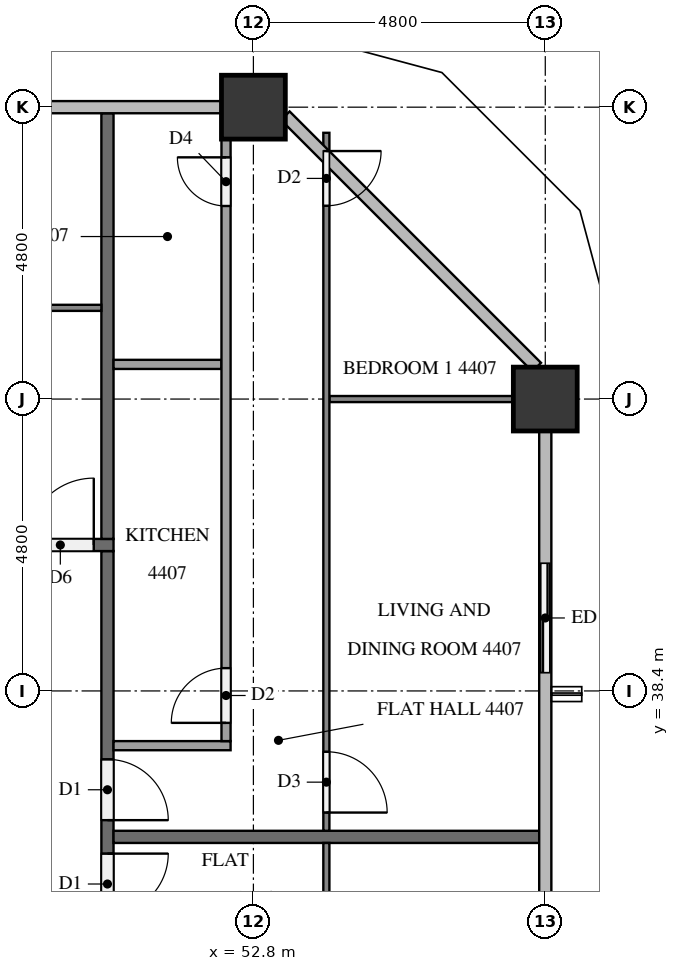
"""IFC4 building model, lengths in metres.
Left out: names, types, materials, properties, quantities, classifications, styles, units other than length and angle.
Written with IfcOpenShell. Run it as: python <this file> out.ifc"""

import sys

from ifc_helpers import new_model, si_unit, direction, frame, frame_2d, origin, origin_2d, place, context, subcontext, project, spatial, rectangle, extrude, element, fill, save


model = new_model("IFC4")
c1 = context("Model", 3, precision=1e-05, world=origin(), true_north=direction((0.0, 1.0)))
c2 = subcontext(c1, "Body", "Model", "MODEL_VIEW")
j1 = project(units=[si_unit("LENGTHUNIT", "METRE"), si_unit("PLANEANGLEUNIT", "RADIAN")], contexts=[c1])
p1 = place(None, origin())
s1 = spatial("IfcSite", under=j1, at=p1, CompositionType="ELEMENT")
p2 = place(p1, origin())
s2 = spatial("IfcBuilding", under=s1, at=p2, CompositionType="ELEMENT")
p3 = place(p2, frame((0.0, 0.0, 170.0)))
s3 = spatial("IfcBuildingStorey", under=s2, at=p3, CompositionType="ELEMENT", Elevation=170.0)
for number, where, z_axis, x_axis in (
    (1, (57.6, 43.2, 0.0), (0.0, 0.0, 1.0), (1.0, 0.0, 0.0)),
    (2, (52.8, 48.0, 0.0), (0.0, 0.0, 1.0), (1.0, 0.0, 0.0)),
):
    element("IfcColumn", number, at=place(p3, frame(where, z_axis=z_axis, x_axis=x_axis)), inside=s3, PredefinedType="COLUMN", context=c2, shape_type="SweptSolid", body=[
        extrude(rectangle(XDim=1.05, YDim=1.05, at=origin_2d()), origin(), (0.0, 0.0, 1.0), 3.1),
    ])
p4 = place(p3, frame((57.6, 38.4, 0.0), z_axis=(0.0, 0.0, 1.0), x_axis=(0.0, 1.0, 0.0)))
e3 = element("IfcWall", 3, at=p4, inside=s3, PredefinedType="SOLIDWALL", context=c2, shape_type="SweptSolid", body=[
    extrude(rectangle(XDim=2.4, YDim=0.15, at=frame_2d((1.2, 0.0))), origin(), (0.0, 0.0, 1.0), 3.1),
])
p5 = place(p4, frame((0.3, 0.0, 0.0)))
e4 = element("IfcOpeningElement", 4, at=p5, cuts=e3, PredefinedType="OPENING", context=c2, shape_type="SweptSolid", body=[
    extrude(rectangle(XDim=1.8, YDim=2.4, at=frame_2d((0.9, 1.2))), frame((0.0, 0.085, 0.0), z_axis=(0.0, -1.0, 0.0), x_axis=(1.0, 0.0, 0.0)), (0.0, 0.0, 1.0), 0.17),
])
p6 = place(p3, frame((50.4, 40.7, 0.0), z_axis=(0.0, 0.0, 1.0), x_axis=(0.0, -1.0, 0.0)))
e5 = element("IfcWall", 5, at=p6, inside=s3, PredefinedType="PARTITIONING", context=c2, shape_type="SweptSolid", body=[
    extrude(rectangle(XDim=28.6, YDim=0.2, at=frame_2d((14.3, 0.0))), origin(), (0.0, 0.0, 1.0), 3.1),
])
p7 = place(p6, frame((26.575, 0.0, 0.0)))
e6 = element("IfcOpeningElement", 6, at=p7, cuts=e5, PredefinedType="OPENING", context=c2, shape_type="SweptSolid", body=[
    extrude(rectangle(XDim=1.0, YDim=2.1, at=frame_2d((0.5, 1.05))), frame((0.0, 0.11, 0.0), z_axis=(0.0, -1.0, 0.0), x_axis=(1.0, 0.0, 0.0)), (0.0, 0.0, 1.0), 0.22),
])
p8 = place(p6, frame((25.025, 0.0, 0.0)))
e7 = element("IfcOpeningElement", 7, at=p8, cuts=e5, PredefinedType="OPENING", context=c2, shape_type="SweptSolid", body=[
    extrude(rectangle(XDim=1.0, YDim=2.1, at=frame_2d((0.5, 1.05))), frame((0.0, 0.11, 0.0), z_axis=(0.0, -1.0, 0.0), x_axis=(1.0, 0.0, 0.0)), (0.0, 0.0, 1.0), 0.22),
])
p9 = place(p6, frame((4.975, 0.0, 0.0)))
e8 = element("IfcOpeningElement", 8, at=p9, cuts=e5, PredefinedType="OPENING", context=c2, shape_type="SweptSolid", body=[
    extrude(rectangle(XDim=1.0, YDim=2.1, at=frame_2d((0.5, 1.05))), frame((0.0, 0.11, 0.0), z_axis=(0.0, -1.0, 0.0), x_axis=(1.0, 0.0, 0.0)), (0.0, 0.0, 1.0), 0.22),
])
p10 = place(p6, frame((3.425, 0.0, 0.0)))
e9 = element("IfcOpeningElement", 9, at=p10, cuts=e5, PredefinedType="OPENING", context=c2, shape_type="SweptSolid", body=[
    extrude(rectangle(XDim=1.0, YDim=2.1, at=frame_2d((0.5, 1.05))), frame((0.0, 0.11, 0.0), z_axis=(0.0, -1.0, 0.0), x_axis=(1.0, 0.0, 0.0)), (0.0, 0.0, 1.0), 0.22),
])
p11 = place(p3, frame((11.9, 40.8, 0.0), z_axis=(0.0, 0.0, 1.0), x_axis=(1.0, 0.0, 0.0)))
e10 = element("IfcWall", 10, at=p11, inside=s3, PredefinedType="PARTITIONING", context=c2, shape_type="SweptSolid", body=[
    extrude(rectangle(XDim=38.6, YDim=0.2, at=frame_2d((19.3, 0.0))), origin(), (0.0, 0.0, 1.0), 3.1),
])
p12 = place(p11, frame((37.175, 0.0, 0.0)))
e11 = element("IfcOpeningElement", 11, at=p12, cuts=e10, PredefinedType="OPENING", context=c2, shape_type="SweptSolid", body=[
    extrude(rectangle(XDim=1.1, YDim=2.1, at=frame_2d((0.55, 1.05))), frame((0.0, 0.11, 0.0), z_axis=(0.0, -1.0, 0.0), x_axis=(1.0, 0.0, 0.0)), (0.0, 0.0, 1.0), 0.22),
])
p13 = place(p11, frame((18.025, 0.0, 0.0)))
e12 = element("IfcOpeningElement", 12, at=p13, cuts=e10, PredefinedType="OPENING", context=c2, shape_type="SweptSolid", body=[
    extrude(rectangle(XDim=1.0, YDim=2.1, at=frame_2d((0.5, 1.05))), frame((0.0, 0.11, 0.0), z_axis=(0.0, -1.0, 0.0), x_axis=(1.0, 0.0, 0.0)), (0.0, 0.0, 1.0), 0.22),
])
p14 = place(p11, frame((3.625, 0.0, 0.0)))
e13 = element("IfcOpeningElement", 13, at=p14, cuts=e10, PredefinedType="OPENING", context=c2, shape_type="SweptSolid", body=[
    extrude(rectangle(XDim=1.0, YDim=2.1, at=frame_2d((0.5, 1.05))), frame((0.0, 0.11, 0.0), z_axis=(0.0, -1.0, 0.0), x_axis=(1.0, 0.0, 0.0)), (0.0, 0.0, 1.0), 0.22),
])
for number, where, z_axis, x_axis in (
    (14, (50.5, 36.0, 0.0), (0.0, 0.0, 1.0), (1.0, 0.0, 0.0)),
    (15, (50.4, 40.9, 0.0), (0.0, 0.0, 1.0), (0.0, 1.0, 0.0)),
):
    element("IfcWall", number, at=place(p3, frame(where, z_axis=z_axis, x_axis=x_axis)), inside=s3, PredefinedType="PARTITIONING", context=c2, shape_type="SweptSolid", body=[
        extrude(rectangle(XDim=7.0, YDim=0.2, at=frame_2d((3.5, 0.0))), origin(), (0.0, 0.0, 1.0), 3.1),
    ])
p15 = place(p3, frame((54.0, 35.9, 0.0), z_axis=(0.0, 0.0, 1.0), x_axis=(0.0, -1.0, 0.0)))
e16 = element("IfcWall", 16, at=p15, inside=s3, PredefinedType="PARTITIONING", context=c2, shape_type="SweptSolid", body=[
    extrude(rectangle(XDim=7.0, YDim=0.1, at=frame_2d((3.5, 0.0))), origin(), (0.0, 0.0, 1.0), 3.1),
])
p16 = place(p15, frame((5.7, 0.0, 0.0)))
e17 = element("IfcOpeningElement", 17, at=p16, cuts=e16, PredefinedType="OPENING", context=c2, shape_type="SweptSolid", body=[
    extrude(rectangle(XDim=1.0, YDim=2.1, at=frame_2d((0.5, 1.05))), frame((0.0, 0.06, 0.0), z_axis=(0.0, -1.0, 0.0), x_axis=(1.0, 0.0, 0.0)), (0.0, 0.0, 1.0), 0.12),
])
p17 = place(p3, frame((54.05, 43.2, 0.0), z_axis=(0.0, 0.0, 1.0), x_axis=(1.0, 0.0, 0.0)))
e18 = element("IfcWall", 18, at=p17, inside=s3, PredefinedType="PARTITIONING", context=c2, shape_type="SweptSolid", body=[
    extrude(rectangle(XDim=3.025, YDim=0.1, at=frame_2d((1.512, 0.0))), origin(), (0.0, 0.0, 1.0), 3.1),
])
p18 = place(p3, frame((54.0, 47.579, 0.0), z_axis=(0.0, 0.0, 1.0), x_axis=(0.0, -1.0, 0.0)))
e19 = element("IfcWall", 19, at=p18, inside=s3, PredefinedType="PARTITIONING", context=c2, shape_type="SweptSolid", body=[
    extrude(rectangle(XDim=11.479, YDim=0.1, at=frame_2d((5.739, 0.0))), origin(), (0.0, 0.0, 1.0), 3.1),
])
p19 = place(p18, frame((10.178, 0.0, 0.0)))
e20 = element("IfcOpeningElement", 20, at=p19, cuts=e19, PredefinedType="OPENING", context=c2, shape_type="SweptSolid", body=[
    extrude(rectangle(XDim=1.0, YDim=2.1, at=frame_2d((0.5, 1.05))), frame((0.0, 0.06, 0.0), z_axis=(0.0, -1.0, 0.0), x_axis=(1.0, 0.0, 0.0)), (0.0, 0.0, 1.0), 0.12),
])
p20 = place(p18, frame((0.3, 0.0, 0.0)))
e21 = element("IfcOpeningElement", 21, at=p20, cuts=e19, PredefinedType="OPENING", context=c2, shape_type="SweptSolid", body=[
    extrude(rectangle(XDim=0.9, YDim=2.1, at=frame_2d((0.45, 1.05))), frame((0.0, 0.06, 0.0), z_axis=(0.0, -1.0, 0.0), x_axis=(1.0, 0.0, 0.0)), (0.0, 0.0, 1.0), 0.12),
])
p21 = place(p3, frame((50.5, 43.77, 0.0), z_axis=(0.0, 0.0, 1.0), x_axis=(1.0, 0.0, 0.0)))
e22 = element("IfcWall", 22, at=p21, inside=s3, PredefinedType="PARTITIONING", context=c2, shape_type="SweptSolid", body=[
    extrude(rectangle(XDim=1.775, YDim=0.15, at=frame_2d((0.887, 0.0))), origin(), (0.0, 0.0, 1.0), 3.1),
])
p22 = place(p3, frame((50.5, 37.5, 0.0), z_axis=(0.0, 0.0, 1.0), x_axis=(1.0, 0.0, 0.0)))
e23 = element("IfcWall", 23, at=p22, inside=s3, PredefinedType="PARTITIONING", context=c2, shape_type="SweptSolid", body=[
    extrude(rectangle(XDim=1.925, YDim=0.15, at=frame_2d((0.962, 0.0))), origin(), (0.0, 0.0, 1.0), 3.1),
])
p23 = place(p3, frame((52.35, 37.575, 0.0), z_axis=(0.0, 0.0, 1.0), x_axis=(0.0, 1.0, 0.0)))
e24 = element("IfcWall", 24, at=p23, inside=s3, PredefinedType="PARTITIONING", context=c2, shape_type="SweptSolid", body=[
    extrude(rectangle(XDim=9.9, YDim=0.15, at=frame_2d((4.95, 0.0))), origin(), (0.0, 0.0, 1.0), 3.1),
])
p24 = place(p23, frame((0.3, 0.0, 0.0)))
e25 = element("IfcOpeningElement", 25, at=p24, cuts=e24, PredefinedType="OPENING", context=c2, shape_type="SweptSolid", body=[
    extrude(rectangle(XDim=0.9, YDim=2.1, at=frame_2d((0.45, 1.05))), frame((0.0, 0.085, 0.0), z_axis=(0.0, -1.0, 0.0), x_axis=(1.0, 0.0, 0.0)), (0.0, 0.0, 1.0), 0.17),
])
p25 = place(p23, frame((8.8, 0.0, 0.0)))
e26 = element("IfcOpeningElement", 26, at=p25, cuts=e24, PredefinedType="OPENING", context=c2, shape_type="SweptSolid", body=[
    extrude(rectangle(XDim=0.8, YDim=2.1, at=frame_2d((0.4, 1.05))), frame((0.0, 0.085, 0.0), z_axis=(0.0, -1.0, 0.0), x_axis=(1.0, 0.0, 0.0)), (0.0, 0.0, 1.0), 0.17),
])
p26 = place(p3, frame((31.3, 44.7, 0.0), z_axis=(0.0, 0.0, 1.0), x_axis=(1.0, 0.0, 0.0)))
e27 = element("IfcWall", 27, at=p26, inside=s3, PredefinedType="PARTITIONING", context=c2, shape_type="SweptSolid", body=[
    extrude(rectangle(XDim=19.0, YDim=0.1, at=frame_2d((9.5, 0.0))), origin(), (0.0, 0.0, 1.0), 3.1),
])
p27 = place(p26, frame((14.65, 0.0, 0.0)))
e28 = element("IfcOpeningElement", 28, at=p27, cuts=e27, PredefinedType="OPENING", context=c2, shape_type="SweptSolid", body=[
    extrude(rectangle(XDim=1.0, YDim=2.1, at=frame_2d((0.5, 1.05))), frame((0.0, 0.06, 0.0), z_axis=(0.0, -1.0, 0.0), x_axis=(1.0, 0.0, 0.0)), (0.0, 0.0, 1.0), 0.12),
])
p28 = place(p26, frame((13.05, 0.0, 0.0)))
e29 = element("IfcOpeningElement", 29, at=p28, cuts=e27, PredefinedType="OPENING", context=c2, shape_type="SweptSolid", body=[
    extrude(rectangle(XDim=0.9, YDim=2.1, at=frame_2d((0.45, 1.05))), frame((0.0, 0.06, 0.0), z_axis=(0.0, -1.0, 0.0), x_axis=(1.0, 0.0, 0.0)), (0.0, 0.0, 1.0), 0.12),
])
p29 = place(p26, frame((5.05, 0.0, 0.0)))
e30 = element("IfcOpeningElement", 30, at=p29, cuts=e27, PredefinedType="OPENING", context=c2, shape_type="SweptSolid", body=[
    extrude(rectangle(XDim=0.9, YDim=2.1, at=frame_2d((0.45, 1.05))), frame((0.0, 0.06, 0.0), z_axis=(0.0, -1.0, 0.0), x_axis=(1.0, 0.0, 0.0)), (0.0, 0.0, 1.0), 0.12),
])
p30 = place(p26, frame((3.45, 0.0, 0.0)))
e31 = element("IfcOpeningElement", 31, at=p30, cuts=e27, PredefinedType="OPENING", context=c2, shape_type="SweptSolid", body=[
    extrude(rectangle(XDim=0.9, YDim=2.1, at=frame_2d((0.45, 1.05))), frame((0.0, 0.06, 0.0), z_axis=(0.0, -1.0, 0.0), x_axis=(1.0, 0.0, 0.0)), (0.0, 0.0, 1.0), 0.12),
])
p31 = place(p5, origin())
e32 = element("IfcDoor", 32, at=p31, inside=s3, OperationType="SLIDING_TO_LEFT", PredefinedType="DOOR", context=c2, shape_type="SweptSolid", body=[
    extrude(rectangle(XDim=1.8, YDim=2.4, at=frame_2d((0.9, 1.2))), frame((0.0, 0.025, 0.0), z_axis=(0.0, -1.0, 0.0), x_axis=(1.0, 0.0, 0.0)), (0.0, 0.0, 1.0), 0.05),
])
fill(e4, e32)
p32 = place(p9, origin())
e33 = element("IfcDoor", 33, at=p32, inside=s3, OperationType="SINGLE_SWING_LEFT", PredefinedType="DOOR", context=c2, shape_type="SweptSolid", body=[
    extrude(rectangle(XDim=1.0, YDim=2.1, at=frame_2d((0.5, 1.05))), frame((0.0, 0.025, 0.0), z_axis=(0.0, -1.0, 0.0), x_axis=(1.0, 0.0, 0.0)), (0.0, 0.0, 1.0), 0.05),
])
fill(e8, e33)
p33 = place(p10, origin())
e34 = element("IfcDoor", 34, at=p33, inside=s3, OperationType="SINGLE_SWING_RIGHT", PredefinedType="DOOR", context=c2, shape_type="SweptSolid", body=[
    extrude(rectangle(XDim=1.0, YDim=2.1, at=frame_2d((0.5, 1.05))), frame((0.0, 0.025, 0.0), z_axis=(0.0, -1.0, 0.0), x_axis=(1.0, 0.0, 0.0)), (0.0, 0.0, 1.0), 0.05),
])
fill(e9, e34)
p34 = place(p12, origin())
e35 = element("IfcDoor", 35, at=p34, inside=s3, OperationType="SINGLE_SWING_RIGHT", PredefinedType="DOOR", context=c2, shape_type="SweptSolid", body=[
    extrude(rectangle(XDim=1.1, YDim=2.1, at=frame_2d((0.55, 1.05))), frame((0.0, 0.025, 0.0), z_axis=(0.0, -1.0, 0.0), x_axis=(1.0, 0.0, 0.0)), (0.0, 0.0, 1.0), 0.05),
])
fill(e11, e35)
p35 = place(p19, origin())
e36 = element("IfcDoor", 36, at=p35, inside=s3, OperationType="SINGLE_SWING_RIGHT", PredefinedType="DOOR", context=c2, shape_type="SweptSolid", body=[
    extrude(rectangle(XDim=1.0, YDim=2.1, at=frame_2d((0.5, 1.05))), frame((0.0, 0.025, 0.0), z_axis=(0.0, -1.0, 0.0), x_axis=(1.0, 0.0, 0.0)), (0.0, 0.0, 1.0), 0.05),
])
fill(e20, e36)
p36 = place(p20, origin())
e37 = element("IfcDoor", 37, at=p36, inside=s3, OperationType="SINGLE_SWING_LEFT", PredefinedType="DOOR", context=c2, shape_type="SweptSolid", body=[
    extrude(rectangle(XDim=0.9, YDim=2.1, at=frame_2d((0.45, 1.05))), frame((0.0, 0.025, 0.0), z_axis=(0.0, -1.0, 0.0), x_axis=(1.0, 0.0, 0.0)), (0.0, 0.0, 1.0), 0.05),
])
fill(e21, e37)
p37 = place(p24, origin())
e38 = element("IfcDoor", 38, at=p37, inside=s3, OperationType="SINGLE_SWING_LEFT", PredefinedType="DOOR", context=c2, shape_type="SweptSolid", body=[
    extrude(rectangle(XDim=0.9, YDim=2.1, at=frame_2d((0.45, 1.05))), frame((0.0, 0.025, 0.0), z_axis=(0.0, -1.0, 0.0), x_axis=(1.0, 0.0, 0.0)), (0.0, 0.0, 1.0), 0.05),
])
fill(e25, e38)
p38 = place(p25, origin())
e39 = element("IfcDoor", 39, at=p38, inside=s3, OperationType="SINGLE_SWING_RIGHT", PredefinedType="DOOR", context=c2, shape_type="SweptSolid", body=[
    extrude(rectangle(XDim=0.8, YDim=2.1, at=frame_2d((0.4, 1.05))), frame((0.0, 0.025, 0.0), z_axis=(0.0, -1.0, 0.0), x_axis=(1.0, 0.0, 0.0)), (0.0, 0.0, 1.0), 0.05),
])
fill(e26, e39)
save(model, sys.argv[1])
